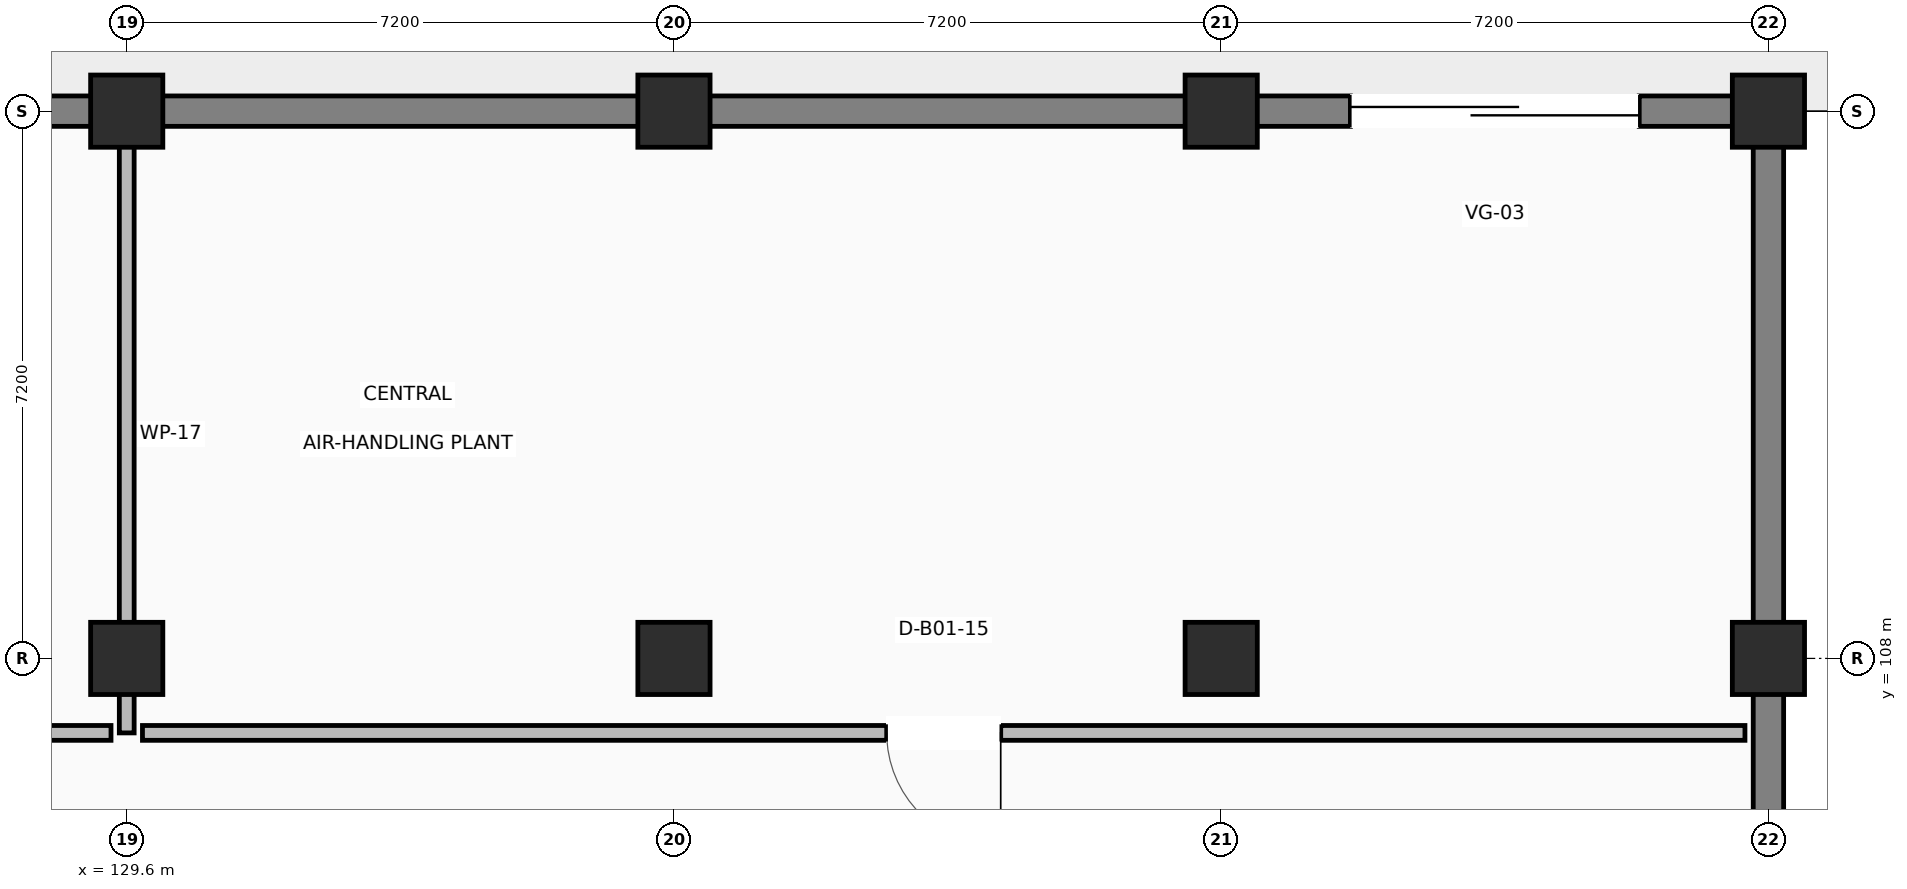
"""IFC4 building model, lengths in metres.
Left out: names, types, materials, properties, quantities, classifications, styles, units other than length and angle.
Written with IfcOpenShell. Run it as: python <this file> out.ifc"""

import sys

from ifc_helpers import new_model, si_unit, direction, frame, frame_2d, origin, origin_2d, place, context, subcontext, project, spatial, rectangle, extrude, element, fill, save


model = new_model("IFC4")
c1 = context("Model", 3, precision=1e-05, world=origin(), true_north=direction((0.0, 1.0)))
c2 = subcontext(c1, "Body", "Model", "MODEL_VIEW")
j1 = project(units=[si_unit("LENGTHUNIT", "METRE"), si_unit("PLANEANGLEUNIT", "RADIAN")], contexts=[c1])
p1 = place(None, origin())
s1 = spatial("IfcSite", under=j1, at=p1, CompositionType="ELEMENT")
p2 = place(p1, origin())
s2 = spatial("IfcBuilding", under=s1, at=p2, CompositionType="ELEMENT")
p3 = place(p2, frame((0.0, 0.0, -4.5)))
s3 = spatial("IfcBuildingStorey", under=s2, at=p3, CompositionType="ELEMENT", Elevation=-4.5)
for number, where, z_axis, x_axis in (
    (1, (129.6, 108.0, 0.0), (0.0, 0.0, 1.0), (1.0, 0.0, 0.0)),
    (2, (129.6, 115.2, 0.0), (0.0, 0.0, 1.0), (1.0, 0.0, 0.0)),
    (3, (136.8, 108.0, 0.0), (0.0, 0.0, 1.0), (1.0, 0.0, 0.0)),
    (4, (136.8, 115.2, 0.0), (0.0, 0.0, 1.0), (1.0, 0.0, 0.0)),
    (5, (144.0, 108.0, 0.0), (0.0, 0.0, 1.0), (1.0, 0.0, 0.0)),
    (6, (144.0, 115.2, 0.0), (0.0, 0.0, 1.0), (1.0, 0.0, 0.0)),
    (7, (151.2, 108.0, 0.0), (0.0, 0.0, 1.0), (1.0, 0.0, 0.0)),
    (8, (151.2, 115.2, 0.0), (0.0, 0.0, 1.0), (1.0, 0.0, 0.0)),
):
    element("IfcColumn", number, at=place(p3, frame(where, z_axis=z_axis, x_axis=x_axis)), inside=s3, PredefinedType="COLUMN", context=c2, shape_type="SweptSolid", body=[
        extrude(rectangle(XDim=0.95, YDim=0.95, at=origin_2d()), origin(), (0.0, 0.0, 1.0), 4.15),
    ])
p4 = place(p3, frame((79.2, 115.2, 0.0), z_axis=(0.0, 0.0, 1.0), x_axis=(1.0, 0.0, 0.0)))
e9 = element("IfcWall", 9, at=p4, inside=s3, PredefinedType="SOLIDWALL", context=c2, shape_type="SweptSolid", body=[
    extrude(rectangle(XDim=72.0, YDim=0.4, at=frame_2d((36.0, 0.0))), origin(), (0.0, 0.0, 1.0), 4.15),
])
p5 = place(p4, frame((37.5, 0.0, 0.0)))
e10 = element("IfcOpeningElement", 10, at=p5, cuts=e9, PredefinedType="OPENING", context=c2, shape_type="SweptSolid", body=[
    extrude(rectangle(XDim=4.2, YDim=3.4, at=frame_2d((2.1, 1.7))), frame((0.0, 0.21, 0.0), z_axis=(0.0, -1.0, 0.0), x_axis=(1.0, 0.0, 0.0)), (0.0, 0.0, 1.0), 0.42),
])
p6 = place(p4, frame((44.8, 0.0, 0.0)))
e11 = element("IfcOpeningElement", 11, at=p6, cuts=e9, PredefinedType="OPENING", context=c2, shape_type="SweptSolid", body=[
    extrude(rectangle(XDim=4.0, YDim=3.4, at=frame_2d((2.0, 1.7))), frame((0.0, 0.21, 0.0), z_axis=(0.0, -1.0, 0.0), x_axis=(1.0, 0.0, 0.0)), (0.0, 0.0, 1.0), 0.42),
])
p7 = place(p4, frame((66.5, 0.0, 0.0)))
e12 = element("IfcOpeningElement", 12, at=p7, cuts=e9, PredefinedType="OPENING", context=c2, shape_type="SweptSolid", body=[
    extrude(rectangle(XDim=3.8, YDim=3.2, at=frame_2d((1.9, 1.6))), frame((0.0, 0.21, 0.0), z_axis=(0.0, -1.0, 0.0), x_axis=(1.0, 0.0, 0.0)), (0.0, 0.0, 1.0), 0.42),
])
p8 = place(p3, frame((151.2, 115.2, 0.0), z_axis=(0.0, 0.0, 1.0), x_axis=(0.0, -1.0, 0.0)))
e13 = element("IfcWall", 13, at=p8, inside=s3, PredefinedType="SOLIDWALL", context=c2, shape_type="SweptSolid", body=[
    extrude(rectangle(XDim=28.8, YDim=0.4, at=frame_2d((14.4, 0.0))), origin(), (0.0, 0.0, 1.0), 4.15),
])
p9 = place(p3, frame((129.6, 114.891, 0.0), z_axis=(0.0, 0.0, 1.0), x_axis=(0.0, -1.0, 0.0)))
e14 = element("IfcWall", 14, at=p9, inside=s3, PredefinedType="PARTITIONING", context=c2, shape_type="SweptSolid", body=[
    extrude(rectangle(XDim=7.871, YDim=0.195, at=frame_2d((3.936, 0.0))), origin(), (0.0, 0.0, 1.0), 3.19),
])
p10 = place(p3, frame((129.393, 107.02, 0.0), z_axis=(0.0, 0.0, 1.0), x_axis=(-1.0, 0.0, 0.0)))
e15 = element("IfcWall", 15, at=p10, inside=s3, PredefinedType="PARTITIONING", context=c2, shape_type="SweptSolid", body=[
    extrude(rectangle(XDim=21.209, YDim=0.195, at=frame_2d((10.604, 0.0))), origin(), (0.0, 0.0, 1.0), 3.19),
])
p11 = place(p10, frame((9.78, 0.0, 0.0)))
e16 = element("IfcOpeningElement", 16, at=p11, cuts=e15, PredefinedType="OPENING", context=c2, shape_type="SweptSolid", body=[
    extrude(rectangle(XDim=1.65, YDim=2.2, at=frame_2d((0.825, 1.1))), frame((0.0, 0.107, 0.0), z_axis=(0.0, -1.0, 0.0), x_axis=(1.0, 0.0, 0.0)), (0.0, 0.0, 1.0), 0.215),
])
p12 = place(p3, frame((150.891, 107.02, 0.0), z_axis=(0.0, 0.0, 1.0), x_axis=(-1.0, 0.0, 0.0)))
e17 = element("IfcWall", 17, at=p12, inside=s3, PredefinedType="PARTITIONING", context=c2, shape_type="SweptSolid", body=[
    extrude(rectangle(XDim=21.084, YDim=0.195, at=frame_2d((10.542, 0.0))), origin(), (0.0, 0.0, 1.0), 3.19),
])
p13 = place(p12, frame((9.792, 0.0, 0.0)))
e18 = element("IfcOpeningElement", 18, at=p13, cuts=e17, PredefinedType="OPENING", context=c2, shape_type="SweptSolid", body=[
    extrude(rectangle(XDim=1.5, YDim=2.15, at=frame_2d((0.75, 1.075))), frame((0.0, 0.107, 0.0), z_axis=(0.0, -1.0, 0.0), x_axis=(1.0, 0.0, 0.0)), (0.0, 0.0, 1.0), 0.215),
])
p14 = place(p7, origin())
e19 = element("IfcDoor", 19, at=p14, inside=s3, OperationType="ROLLINGUP", PredefinedType="GATE", context=c2, shape_type="SweptSolid", body=[
    extrude(rectangle(XDim=3.8, YDim=3.2, at=frame_2d((1.9, 1.6))), frame((0.0, 0.025, 0.0), z_axis=(0.0, -1.0, 0.0), x_axis=(1.0, 0.0, 0.0)), (0.0, 0.0, 1.0), 0.05),
])
fill(e12, e19)
p15 = place(p13, origin())
e20 = element("IfcDoor", 20, at=p15, inside=s3, OperationType="SINGLE_SWING_LEFT", PredefinedType="DOOR", context=c2, shape_type="SweptSolid", body=[
    extrude(rectangle(XDim=1.5, YDim=2.15, at=frame_2d((0.75, 1.075))), frame((0.0, 0.025, 0.0), z_axis=(0.0, -1.0, 0.0), x_axis=(1.0, 0.0, 0.0)), (0.0, 0.0, 1.0), 0.05),
])
fill(e18, e20)
save(model, sys.argv[1])
